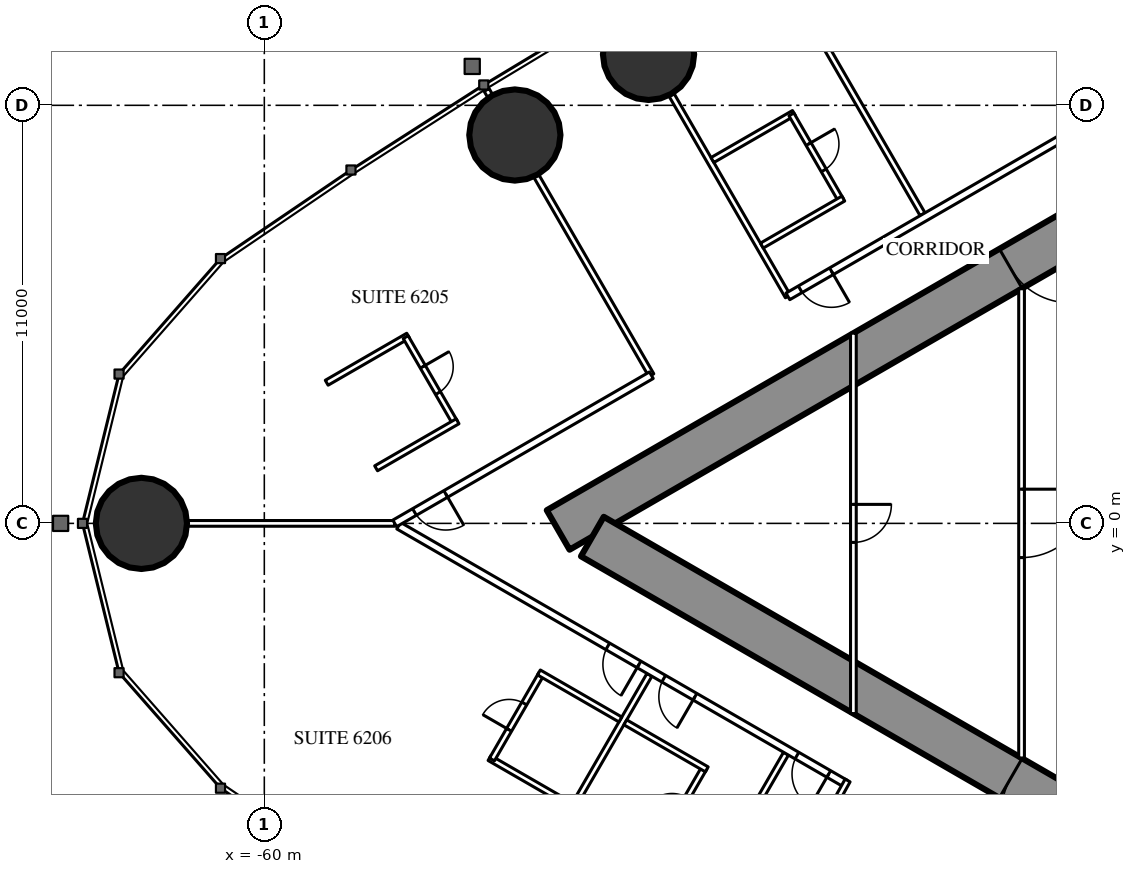
"""IFC4 building model, lengths in metres.
Left out: names, types, materials, properties, quantities, classifications, styles, units other than length and angle.
Written with IfcOpenShell. Run it as: python <this file> out.ifc"""

import sys

from ifc_helpers import new_model, si_unit, direction, frame, frame_2d, origin, origin_2d, place, context, subcontext, project, spatial, rectangle, circle, extrude, element, fill, save


model = new_model("IFC4")
c1 = context("Model", 3, precision=1e-05, world=origin(), true_north=direction((0.0, 1.0)))
c2 = subcontext(c1, "Body", "Model", "MODEL_VIEW")
j1 = project(units=[si_unit("LENGTHUNIT", "METRE"), si_unit("PLANEANGLEUNIT", "RADIAN")], contexts=[c1])
p1 = place(None, origin())
s1 = spatial("IfcSite", under=j1, at=p1, CompositionType="ELEMENT")
p2 = place(p1, origin())
s2 = spatial("IfcBuilding", under=s1, at=p2, CompositionType="ELEMENT")
p3 = place(p2, frame((0.0, 0.0, 233.3)))
s3 = spatial("IfcBuildingStorey", under=s2, at=p3, CompositionType="ELEMENT", Elevation=233.3)
for number, where, z_axis, x_axis in (
    (1, (-63.234, 0.0, 0.0), (0.0, 0.0, 1.0), (1.0, 0.0, 0.0)),
    (2, (-49.89, 12.34, 0.0), (0.0, 0.0, 1.0), (1.0, 0.0, 0.0)),
    (3, (-53.408, 10.219, 0.0), (0.0, 0.0, 1.0), (1.0, 0.0, 0.0)),
):
    element("IfcColumn", number, at=place(p3, frame(where, z_axis=z_axis, x_axis=x_axis)), inside=s3, PredefinedType="COLUMN", context=c2, shape_type="SweptSolid", body=[
        extrude(circle(Radius=1.2, at=origin_2d()), origin(), (0.0, 0.0, 1.0), 3.6),
    ])
p4 = place(p3, frame((-27.2, 14.3, 0.0), z_axis=(0.0, 0.0, 1.0), x_axis=(-0.866026593062, -0.499997940104, 0.0)))
e4 = element("IfcWall", 4, at=p4, inside=s3, PredefinedType="SHEAR", context=c2, shape_type="SweptSolid", body=[
    extrude(rectangle(XDim=28.946, YDim=1.2, at=frame_2d((14.473, 0.0))), origin(), (0.0, 0.0, 1.0), 3.6),
])
p5 = place(p4, frame((4.6, 0.0, 0.0)))
e5 = element("IfcOpeningElement", 5, at=p5, cuts=e4, PredefinedType="OPENING", context=c2, shape_type="SweptSolid", body=[
    extrude(rectangle(XDim=1.0, YDim=2.2, at=frame_2d((0.5, 1.1))), frame((0.0, 0.61, 0.0), z_axis=(0.0, -1.0, 0.0), x_axis=(1.0, 0.0, 0.0)), (0.0, 0.0, 1.0), 1.22),
])
p6 = place(p4, frame((13.395, 0.0, 0.0)))
e6 = element("IfcOpeningElement", 6, at=p6, cuts=e4, PredefinedType="OPENING", context=c2, shape_type="SweptSolid", body=[
    extrude(rectangle(XDim=1.8, YDim=2.2, at=frame_2d((0.9, 1.1))), frame((0.0, 0.61, 0.0), z_axis=(0.0, -1.0, 0.0), x_axis=(1.0, 0.0, 0.0)), (0.0, 0.0, 1.0), 1.22),
])
p7 = place(p3, frame((-27.2, -14.3, 0.0), z_axis=(0.0, 0.0, 1.0), x_axis=(-0.866024021859, 0.500002393557, 0.0)))
e7 = element("IfcWall", 7, at=p7, inside=s3, PredefinedType="SHEAR", context=c2, shape_type="SweptSolid", body=[
    extrude(rectangle(XDim=27.907, YDim=1.2, at=frame_2d((13.954, 0.0))), origin(), (0.0, 0.0, 1.0), 3.6),
])
p8 = place(p7, frame((4.6, 0.0, 0.0)))
e8 = element("IfcOpeningElement", 8, at=p8, cuts=e7, PredefinedType="OPENING", context=c2, shape_type="SweptSolid", body=[
    extrude(rectangle(XDim=1.0, YDim=2.2, at=frame_2d((0.5, 1.1))), frame((0.0, 0.61, 0.0), z_axis=(0.0, -1.0, 0.0), x_axis=(1.0, 0.0, 0.0)), (0.0, 0.0, 1.0), 1.22),
])
p9 = place(p7, frame((13.395, 0.0, 0.0)))
e9 = element("IfcOpeningElement", 9, at=p9, cuts=e7, PredefinedType="OPENING", context=c2, shape_type="SweptSolid", body=[
    extrude(rectangle(XDim=1.8, YDim=2.2, at=frame_2d((0.9, 1.1))), frame((0.0, 0.61, 0.0), z_axis=(0.0, -1.0, 0.0), x_axis=(1.0, 0.0, 0.0)), (0.0, 0.0, 1.0), 1.22),
])
p10 = place(p3, frame((-42.68, 8.134, 0.0), z_axis=(0.0, 0.0, 1.0), x_axis=(-0.499984479505, 0.866034364361, 0.0)))
e10 = element("IfcWall", 10, at=p10, inside=s3, PredefinedType="PARTITIONING", context=c2, shape_type="SweptSolid", body=[
    extrude(rectangle(XDim=5.995, YDim=0.15, at=frame_2d((2.998, 0.0))), origin(), (0.0, 0.0, 1.0), 2.45),
])
p11 = place(p3, frame((-46.224, 5.972, 0.0), z_axis=(0.0, 0.0, 1.0), x_axis=(-0.500021351822, 0.866013075953, 0.0)))
e11 = element("IfcWall", 11, at=p11, inside=s3, PredefinedType="PARTITIONING", context=c2, shape_type="SweptSolid", body=[
    extrude(rectangle(XDim=6.128, YDim=0.15, at=frame_2d((3.064, 0.0))), origin(), (0.0, 0.0, 1.0), 2.45),
])
p12 = place(p3, frame((-49.816, 3.898, 0.0), z_axis=(0.0, 0.0, 1.0), x_axis=(-0.500001913541, 0.866024298998, 0.0)))
e12 = element("IfcWall", 12, at=p12, inside=s3, PredefinedType="PARTITIONING", context=c2, shape_type="SweptSolid", body=[
    extrude(rectangle(XDim=6.05, YDim=0.15, at=frame_2d((3.025, 0.0))), origin(), (0.0, 0.0, 1.0), 2.45),
])
p13 = place(p3, frame((-54.061, 11.25, 0.0), z_axis=(0.0, 0.0, 1.0), x_axis=(-0.500391173478, 0.865799441849, 0.0)))
e13 = element("IfcWall", 13, at=p13, inside=s3, PredefinedType="PARTITIONING", context=c2, shape_type="SweptSolid", body=[
    extrude(rectangle(XDim=0.179, YDim=0.15, at=frame_2d((0.089, 0.0))), origin(), (0.0, 0.0, 1.0), 2.45),
])
p14 = place(p3, frame((-46.274, -6.059, 0.0), z_axis=(0.0, 0.0, 1.0), x_axis=(-0.500020471368, -0.866013584312, 0.0)))
e14 = element("IfcWall", 14, at=p14, inside=s3, PredefinedType="PARTITIONING", context=c2, shape_type="SweptSolid", body=[
    extrude(rectangle(XDim=6.028, YDim=0.15, at=frame_2d((3.014, 0.0))), origin(), (0.0, 0.0, 1.0), 2.45),
])
p15 = place(p3, frame((-49.866, -3.985, 0.0), z_axis=(0.0, 0.0, 1.0), x_axis=(-0.500000694566, -0.866025002776, 0.0)))
e15 = element("IfcWall", 15, at=p15, inside=s3, PredefinedType="PARTITIONING", context=c2, shape_type="SweptSolid", body=[
    extrude(rectangle(XDim=5.95, YDim=0.15, at=frame_2d((2.975, 0.0))), origin(), (0.0, 0.0, 1.0), 2.45),
])
p16 = place(p3, frame((-56.568, 0.0, 0.0), z_axis=(0.0, 0.0, 1.0), x_axis=(-1.0, 0.0, 0.0)))
e16 = element("IfcWall", 16, at=p16, inside=s3, PredefinedType="PARTITIONING", context=c2, shape_type="SweptSolid", body=[
    extrude(rectangle(XDim=5.446, YDim=0.15, at=frame_2d((2.723, 0.0))), origin(), (0.0, 0.0, 1.0), 2.45),
])
p17 = place(p3, frame((-44.715, -6.844, 0.0), z_axis=(0.0, 0.0, 1.0), x_axis=(-0.866025261224, 0.500000246922, 0.0)))
e17 = element("IfcWall", 17, at=p17, inside=s3, PredefinedType="PARTITIONING", context=c2, shape_type="SweptSolid", body=[
    extrude(rectangle(XDim=13.567, YDim=0.2, at=frame_2d((6.783, 0.0))), origin(), (0.0, 0.0, 1.0), 3.35),
])
p18 = place(p17, frame((6.266, 0.0, 0.0)))
e18 = element("IfcOpeningElement", 18, at=p18, cuts=e17, PredefinedType="OPENING", context=c2, shape_type="SweptSolid", body=[
    extrude(rectangle(XDim=0.95, YDim=2.2, at=frame_2d((0.475, 1.1))), frame((0.0, 0.11, 0.0), z_axis=(0.0, -1.0, 0.0), x_axis=(1.0, 0.0, 0.0)), (0.0, 0.0, 1.0), 0.22),
])
p19 = place(p17, frame((4.565, 0.0, 0.0)))
e19 = element("IfcOpeningElement", 19, at=p19, cuts=e17, PredefinedType="OPENING", context=c2, shape_type="SweptSolid", body=[
    extrude(rectangle(XDim=0.95, YDim=2.2, at=frame_2d((0.475, 1.1))), frame((0.0, 0.11, 0.0), z_axis=(0.0, -1.0, 0.0), x_axis=(1.0, 0.0, 0.0)), (0.0, 0.0, 1.0), 0.22),
])
p20 = place(p17, frame((0.5, 0.0, 0.0)))
e20 = element("IfcOpeningElement", 20, at=p20, cuts=e17, PredefinedType="OPENING", context=c2, shape_type="SweptSolid", body=[
    extrude(rectangle(XDim=0.967, YDim=2.2, at=frame_2d((0.483, 1.1))), frame((0.0, 0.11, 0.0), z_axis=(0.0, -1.0, 0.0), x_axis=(1.0, 0.0, 0.0)), (0.0, 0.0, 1.0), 0.22),
])
p21 = place(p3, frame((-44.652, -6.764, 0.0), z_axis=(0.0, 0.0, 1.0), x_axis=(-0.485424724123, -0.874278466629, 0.0)))
e21 = element("IfcWall", 21, at=p21, inside=s3, PredefinedType="PARTITIONING", context=c2, shape_type="SweptSolid", body=[
    extrude(rectangle(XDim=1.805, YDim=0.15, at=frame_2d((0.903, 0.0))), origin(), (0.0, 0.0, 1.0), 3.35),
])
p22 = place(p3, frame((-46.065, 10.798, 0.0), z_axis=(0.0, 0.0, 1.0), x_axis=(-0.866031185235, -0.4999899861, 0.0)))
e22 = element("IfcWall", 22, at=p22, inside=s3, PredefinedType="PARTITIONING", context=c2, shape_type="SweptSolid", body=[
    extrude(rectangle(XDim=2.475, YDim=0.15, at=frame_2d((1.238, 0.0))), origin(), (0.0, 0.0, 1.0), 3.35),
])
p23 = place(p3, frame((-44.83, 8.509, 0.0), z_axis=(0.0, 0.0, 1.0), x_axis=(-0.499936506574, 0.866062058628, 0.0)))
e23 = element("IfcWall", 23, at=p23, inside=s3, PredefinedType="PARTITIONING", context=c2, shape_type="SweptSolid", body=[
    extrude(rectangle(XDim=2.6, YDim=0.15, at=frame_2d((1.3, 0.0))), origin(), (0.0, 0.0, 1.0), 3.35),
])
p24 = place(p23, frame((0.9, 0.0, 0.0)))
e24 = element("IfcOpeningElement", 24, at=p24, cuts=e23, PredefinedType="OPENING", context=c2, shape_type="SweptSolid", body=[
    extrude(rectangle(XDim=0.8, YDim=2.2, at=frame_2d((0.4, 1.1))), frame((0.0, 0.085, 0.0), z_axis=(0.0, -1.0, 0.0), x_axis=(1.0, 0.0, 0.0)), (0.0, 0.0, 1.0), 0.17),
])
for number, where, z_axis, x_axis in (
    (25, (-44.765, 8.546, 0.0), (0.0, 0.0, 1.0), (-0.866, -0.5, 0.0)),
    (26, (-56.215, 4.938, 0.0), (0.0, 0.0, 1.0), (-0.866, -0.5, 0.0)),
):
    element("IfcWall", number, at=place(p3, frame(where, z_axis=z_axis, x_axis=x_axis)), inside=s3, PredefinedType="PARTITIONING", context=c2, shape_type="SweptSolid", body=[
        extrude(rectangle(XDim=2.475, YDim=0.15, at=frame_2d((1.237, 0.0))), origin(), (0.0, 0.0, 1.0), 3.35),
    ])
p25 = place(p3, frame((-54.98, 2.649, 0.0), z_axis=(0.0, 0.0, 1.0), x_axis=(-0.500006934395, 0.866021400173, 0.0)))
e27 = element("IfcWall", 27, at=p25, inside=s3, PredefinedType="PARTITIONING", context=c2, shape_type="SweptSolid", body=[
    extrude(rectangle(XDim=2.6, YDim=0.15, at=frame_2d((1.3, 0.0))), origin(), (0.0, 0.0, 1.0), 3.35),
])
p26 = place(p25, frame((0.9, 0.0, 0.0)))
e28 = element("IfcOpeningElement", 28, at=p26, cuts=e27, PredefinedType="OPENING", context=c2, shape_type="SweptSolid", body=[
    extrude(rectangle(XDim=0.8, YDim=2.2, at=frame_2d((0.4, 1.1))), frame((0.0, 0.085, 0.0), z_axis=(0.0, -1.0, 0.0), x_axis=(1.0, 0.0, 0.0)), (0.0, 0.0, 1.0), 0.17),
])
for number, where, z_axis, x_axis in (
    (29, (-54.915, 2.687, 0.0), (0.0, 0.0, 1.0), (-0.866, -0.5, 0.0)),
    (30, (-51.931, -7.411, 0.0), (0.0, 0.0, 1.0), (-0.866, 0.5, 0.0)),
):
    element("IfcWall", number, at=place(p3, frame(where, z_axis=z_axis, x_axis=x_axis)), inside=s3, PredefinedType="PARTITIONING", context=c2, shape_type="SweptSolid", body=[
        extrude(rectangle(XDim=2.475, YDim=0.15, at=frame_2d((1.237, 0.0))), origin(), (0.0, 0.0, 1.0), 3.35),
    ])
p27 = place(p3, frame((-52.71, -3.96, 0.0), z_axis=(0.0, 0.0, 1.0), x_axis=(-0.500006934395, -0.866021400173, 0.0)))
e31 = element("IfcWall", 31, at=p27, inside=s3, PredefinedType="PARTITIONING", context=c2, shape_type="SweptSolid", body=[
    extrude(rectangle(XDim=2.6, YDim=0.15, at=frame_2d((1.3, 0.0))), origin(), (0.0, 0.0, 1.0), 3.35),
])
p28 = place(p27, frame((0.9, 0.0, 0.0)))
e32 = element("IfcOpeningElement", 32, at=p28, cuts=e31, PredefinedType="OPENING", context=c2, shape_type="SweptSolid", body=[
    extrude(rectangle(XDim=0.8, YDim=2.2, at=frame_2d((0.4, 1.1))), frame((0.0, 0.085, 0.0), z_axis=(0.0, -1.0, 0.0), x_axis=(1.0, 0.0, 0.0)), (0.0, 0.0, 1.0), 0.17),
])
p29 = place(p3, frame((-50.631, -5.16, 0.0), z_axis=(0.0, 0.0, 1.0), x_axis=(-0.86604923931, 0.499958713387, 0.0)))
e33 = element("IfcWall", 33, at=p29, inside=s3, PredefinedType="PARTITIONING", context=c2, shape_type="SweptSolid", body=[
    extrude(rectangle(XDim=2.475, YDim=0.15, at=frame_2d((1.237, 0.0))), origin(), (0.0, 0.0, 1.0), 2.5),
])
p30 = place(p3, frame((-48.423, -6.435, 0.0), z_axis=(0.0, 0.0, 1.0), x_axis=(-0.500006934395, -0.866021400173, 0.0)))
e34 = element("IfcWall", 34, at=p30, inside=s3, PredefinedType="PARTITIONING", context=c2, shape_type="SweptSolid", body=[
    extrude(rectangle(XDim=2.6, YDim=0.15, at=frame_2d((1.3, 0.0))), origin(), (0.0, 0.0, 1.0), 3.35),
])
p31 = place(p30, frame((0.9, 0.0, 0.0)))
e35 = element("IfcOpeningElement", 35, at=p31, cuts=e34, PredefinedType="OPENING", context=c2, shape_type="SweptSolid", body=[
    extrude(rectangle(XDim=0.8, YDim=2.2, at=frame_2d((0.4, 1.1))), frame((0.0, 0.085, 0.0), z_axis=(0.0, -1.0, 0.0), x_axis=(1.0, 0.0, 0.0)), (0.0, 0.0, 1.0), 0.17),
])
p32 = place(p3, frame((-48.358, -6.472, 0.0), z_axis=(0.0, 0.0, 1.0), x_axis=(-0.866073894602, 0.499916002032, 0.0)))
e36 = element("IfcWall", 36, at=p32, inside=s3, PredefinedType="PARTITIONING", context=c2, shape_type="SweptSolid", body=[
    extrude(rectangle(XDim=2.475, YDim=0.15, at=frame_2d((1.238, 0.0))), origin(), (0.0, 0.0, 1.0), 2.5),
])
p33 = place(p3, frame((-28.737, 16.068, 0.0), z_axis=(0.0, 0.0, 1.0), x_axis=(-0.866023901326, -0.500002602325, 0.0)))
e37 = element("IfcWall", 37, at=p33, inside=s3, PredefinedType="PARTITIONING", context=c2, shape_type="SweptSolid", body=[
    extrude(rectangle(XDim=20.192, YDim=0.2, at=frame_2d((10.096, 0.0))), origin(), (0.0, 0.0, 1.0), 3.35),
])
p34 = place(p33, frame((1.08, 0.0, 0.0)))
e38 = element("IfcOpeningElement", 38, at=p34, cuts=e37, PredefinedType="OPENING", context=c2, shape_type="SweptSolid", body=[
    extrude(rectangle(XDim=1.8, YDim=2.03, at=frame_2d((0.9, 1.015))), frame((0.0, 0.11, 0.0), z_axis=(0.0, -1.0, 0.0), x_axis=(1.0, 0.0, 0.0)), (0.0, 0.0, 1.0), 0.22),
])
p35 = place(p33, frame((6.86, 0.0, 0.0)))
e39 = element("IfcOpeningElement", 39, at=p35, cuts=e37, PredefinedType="OPENING", context=c2, shape_type="SweptSolid", body=[
    extrude(rectangle(XDim=1.0, YDim=2.2, at=frame_2d((0.5, 1.1))), frame((0.0, 0.11, 0.0), z_axis=(0.0, -1.0, 0.0), x_axis=(1.0, 0.0, 0.0)), (0.0, 0.0, 1.0), 0.22),
])
p36 = place(p33, frame((18.867, 0.0, 0.0)))
e40 = element("IfcOpeningElement", 40, at=p36, cuts=e37, PredefinedType="OPENING", context=c2, shape_type="SweptSolid", body=[
    extrude(rectangle(XDim=0.95, YDim=2.2, at=frame_2d((0.475, 1.1))), frame((0.0, 0.11, 0.0), z_axis=(0.0, -1.0, 0.0), x_axis=(1.0, 0.0, 0.0)), (0.0, 0.0, 1.0), 0.22),
])
p37 = place(p3, frame((-49.816, 3.898, 0.0), z_axis=(0.0, 0.0, 1.0), x_axis=(-0.866028102716, -0.499995325284, 0.0)))
e41 = element("IfcWall", 41, at=p37, inside=s3, PredefinedType="PARTITIONING", context=c2, shape_type="SweptSolid", body=[
    extrude(rectangle(XDim=7.796, YDim=0.2, at=frame_2d((3.898, 0.0))), origin(), (0.0, 0.0, 1.0), 3.35),
])
p38 = place(p37, frame((6.246, 0.0, 0.0)))
e42 = element("IfcOpeningElement", 42, at=p38, cuts=e41, PredefinedType="OPENING", context=c2, shape_type="SweptSolid", body=[
    extrude(rectangle(XDim=0.95, YDim=2.2, at=frame_2d((0.475, 1.1))), frame((0.0, 0.11, 0.0), z_axis=(0.0, -1.0, 0.0), x_axis=(1.0, 0.0, 0.0)), (0.0, 0.0, 1.0), 0.22),
])
p39 = place(p3, frame((-40.075, 6.174, 0.0), z_axis=(0.0, 0.0, 1.0), x_axis=(0.0, -1.0, 0.0)))
e43 = element("IfcWall", 43, at=p39, inside=s3, PredefinedType="PARTITIONING", context=c2, shape_type="SweptSolid", body=[
    extrude(rectangle(XDim=12.348, YDim=0.15, at=frame_2d((6.174, 0.0))), origin(), (0.0, 0.0, 1.0), 3.35),
])
p40 = place(p39, frame((5.274, 0.0, 0.0)))
e44 = element("IfcOpeningElement", 44, at=p40, cuts=e43, PredefinedType="OPENING", context=c2, shape_type="SweptSolid", body=[
    extrude(rectangle(XDim=1.8, YDim=2.2, at=frame_2d((0.9, 1.1))), frame((0.0, 0.085, 0.0), z_axis=(0.0, -1.0, 0.0), x_axis=(1.0, 0.0, 0.0)), (0.0, 0.0, 1.0), 0.17),
])
p41 = place(p3, frame((-44.5, 5.005, 0.0), z_axis=(0.0, 0.0, 1.0), x_axis=(0.0, -1.0, 0.0)))
e45 = element("IfcWall", 45, at=p41, inside=s3, PredefinedType="PARTITIONING", context=c2, shape_type="SweptSolid", body=[
    extrude(rectangle(XDim=10.009, YDim=0.15, at=frame_2d((5.005, 0.0))), origin(), (0.0, 0.0, 1.0), 2.5),
])
p42 = place(p41, frame((4.505, 0.0, 0.0)))
e46 = element("IfcOpeningElement", 46, at=p42, cuts=e45, PredefinedType="OPENING", context=c2, shape_type="SweptSolid", body=[
    extrude(rectangle(XDim=1.0, YDim=2.2, at=frame_2d((0.5, 1.1))), frame((0.0, 0.085, 0.0), z_axis=(0.0, -1.0, 0.0), x_axis=(1.0, 0.0, 0.0)), (0.0, 0.0, 1.0), 0.17),
])
p43 = place(p24, origin())
e47 = element("IfcDoor", 47, at=p43, inside=s3, OperationType="SINGLE_SWING_RIGHT", PredefinedType="DOOR", context=c2, shape_type="SweptSolid", body=[
    extrude(rectangle(XDim=0.8, YDim=2.2, at=frame_2d((0.4, 1.1))), frame((0.0, 0.025, 0.0), z_axis=(0.0, -1.0, 0.0), x_axis=(1.0, 0.0, 0.0)), (0.0, 0.0, 1.0), 0.05),
])
fill(e24, e47)
p44 = place(p36, origin())
e48 = element("IfcDoor", 48, at=p44, inside=s3, OperationType="SINGLE_SWING_LEFT", PredefinedType="DOOR", context=c2, shape_type="SweptSolid", body=[
    extrude(rectangle(XDim=0.95, YDim=2.2, at=frame_2d((0.475, 1.1))), frame((0.0, 0.025, 0.0), z_axis=(0.0, -1.0, 0.0), x_axis=(1.0, 0.0, 0.0)), (0.0, 0.0, 1.0), 0.05),
])
fill(e40, e48)
p45 = place(p26, origin())
e49 = element("IfcDoor", 49, at=p45, inside=s3, OperationType="SINGLE_SWING_RIGHT", PredefinedType="DOOR", context=c2, shape_type="SweptSolid", body=[
    extrude(rectangle(XDim=0.8, YDim=2.2, at=frame_2d((0.4, 1.1))), frame((0.0, 0.025, 0.0), z_axis=(0.0, -1.0, 0.0), x_axis=(1.0, 0.0, 0.0)), (0.0, 0.0, 1.0), 0.05),
])
fill(e28, e49)
p46 = place(p38, origin())
e50 = element("IfcDoor", 50, at=p46, inside=s3, OperationType="SINGLE_SWING_LEFT", PredefinedType="DOOR", context=c2, shape_type="SweptSolid", body=[
    extrude(rectangle(XDim=0.95, YDim=2.2, at=frame_2d((0.475, 1.1))), frame((0.0, 0.025, 0.0), z_axis=(0.0, -1.0, 0.0), x_axis=(1.0, 0.0, 0.0)), (0.0, 0.0, 1.0), 0.05),
])
fill(e42, e50)
p47 = place(p28, origin())
e51 = element("IfcDoor", 51, at=p47, inside=s3, OperationType="SINGLE_SWING_RIGHT", PredefinedType="DOOR", context=c2, shape_type="SweptSolid", body=[
    extrude(rectangle(XDim=0.8, YDim=2.2, at=frame_2d((0.4, 1.1))), frame((0.0, 0.025, 0.0), z_axis=(0.0, -1.0, 0.0), x_axis=(1.0, 0.0, 0.0)), (0.0, 0.0, 1.0), 0.05),
])
fill(e32, e51)
p48 = place(p18, origin())
e52 = element("IfcDoor", 52, at=p48, inside=s3, OperationType="SINGLE_SWING_LEFT", PredefinedType="DOOR", context=c2, shape_type="SweptSolid", body=[
    extrude(rectangle(XDim=0.95, YDim=2.2, at=frame_2d((0.475, 1.1))), frame((0.0, 0.025, 0.0), z_axis=(0.0, -1.0, 0.0), x_axis=(1.0, 0.0, 0.0)), (0.0, 0.0, 1.0), 0.05),
])
fill(e18, e52)
p49 = place(p19, origin())
e53 = element("IfcDoor", 53, at=p49, inside=s3, OperationType="SINGLE_SWING_LEFT", PredefinedType="DOOR", context=c2, shape_type="SweptSolid", body=[
    extrude(rectangle(XDim=0.95, YDim=2.2, at=frame_2d((0.475, 1.1))), frame((0.0, 0.025, 0.0), z_axis=(0.0, -1.0, 0.0), x_axis=(1.0, 0.0, 0.0)), (0.0, 0.0, 1.0), 0.05),
])
fill(e19, e53)
p50 = place(p20, origin())
e54 = element("IfcDoor", 54, at=p50, inside=s3, OperationType="SINGLE_SWING_LEFT", PredefinedType="DOOR", context=c2, shape_type="SweptSolid", body=[
    extrude(rectangle(XDim=0.967, YDim=2.2, at=frame_2d((0.483, 1.1))), frame((0.0, 0.025, 0.0), z_axis=(0.0, -1.0, 0.0), x_axis=(1.0, 0.0, 0.0)), (0.0, 0.0, 1.0), 0.05),
])
fill(e20, e54)
p51 = place(p40, origin())
e55 = element("IfcDoor", 55, at=p51, inside=s3, OperationType="DOUBLE_DOOR_SINGLE_SWING", PredefinedType="DOOR", context=c2, shape_type="SweptSolid", body=[
    extrude(rectangle(XDim=1.8, YDim=2.2, at=frame_2d((0.9, 1.1))), frame((0.0, 0.025, 0.0), z_axis=(0.0, -1.0, 0.0), x_axis=(1.0, 0.0, 0.0)), (0.0, 0.0, 1.0), 0.05),
])
fill(e44, e55)
p52 = place(p42, origin())
e56 = element("IfcDoor", 56, at=p52, inside=s3, OperationType="SINGLE_SWING_LEFT", PredefinedType="DOOR", context=c2, shape_type="SweptSolid", body=[
    extrude(rectangle(XDim=1.0, YDim=2.2, at=frame_2d((0.5, 1.1))), frame((0.0, 0.025, 0.0), z_axis=(0.0, -1.0, 0.0), x_axis=(1.0, 0.0, 0.0)), (0.0, 0.0, 1.0), 0.05),
])
fill(e46, e56)
p53 = place(p6, origin())
e57 = element("IfcDoor", 57, at=p53, inside=s3, OperationType="DOUBLE_DOOR_SINGLE_SWING", PredefinedType="DOOR", context=c2, shape_type="SweptSolid", body=[
    extrude(rectangle(XDim=1.8, YDim=2.2, at=frame_2d((0.9, 1.1))), frame((0.0, 0.025, 0.0), z_axis=(0.0, -1.0, 0.0), x_axis=(1.0, 0.0, 0.0)), (0.0, 0.0, 1.0), 0.05),
])
fill(e6, e57)
p54 = place(p9, origin())
e58 = element("IfcDoor", 58, at=p54, inside=s3, OperationType="DOUBLE_DOOR_SINGLE_SWING", PredefinedType="DOOR", context=c2, shape_type="SweptSolid", body=[
    extrude(rectangle(XDim=1.8, YDim=2.2, at=frame_2d((0.9, 1.1))), frame((0.0, 0.025, 0.0), z_axis=(0.0, -1.0, 0.0), x_axis=(1.0, 0.0, 0.0)), (0.0, 0.0, 1.0), 0.05),
])
fill(e9, e58)
save(model, sys.argv[1])
